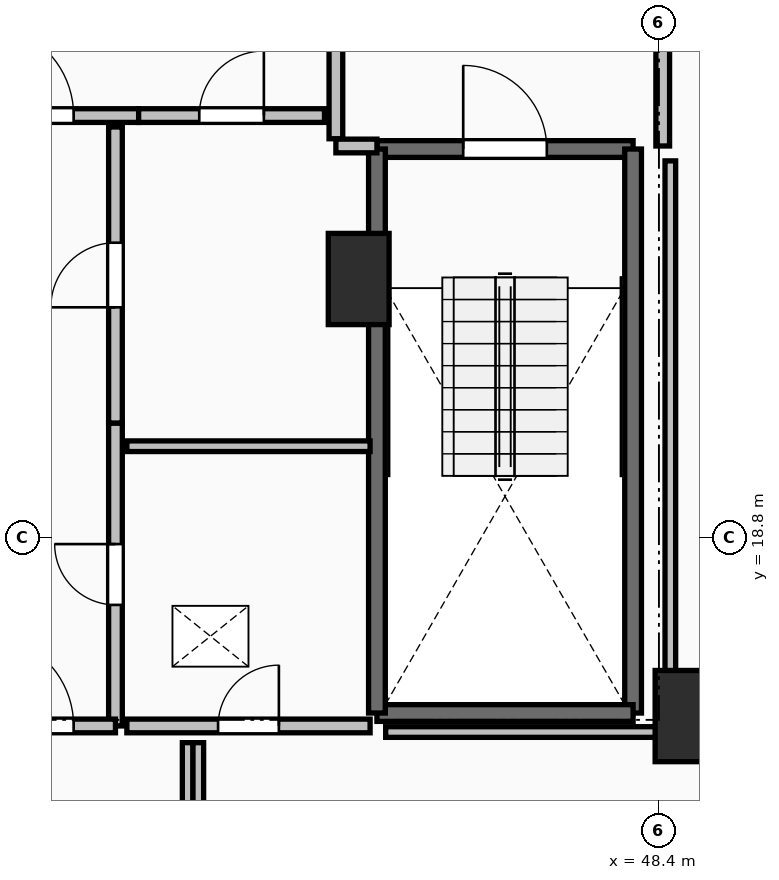
"""IFC4 building model, lengths in metres.
Left out: names, types, materials, properties, quantities, classifications, styles, units other than length and angle.
Written with IfcOpenShell. Run it as: python <this file> out.ifc"""

import sys

from ifc_helpers import new_model, si_unit, direction, frame, frame_2d, origin, origin_2d, place, context, subcontext, project, spatial, rectangle, extrude, element, fill, save


model = new_model("IFC4")
c1 = context("Model", 3, precision=1e-05, world=origin(), true_north=direction((0.0, 1.0)))
c2 = subcontext(c1, "Body", "Model", "MODEL_VIEW")
j1 = project(units=[si_unit("LENGTHUNIT", "METRE"), si_unit("PLANEANGLEUNIT", "RADIAN")], contexts=[c1])
p1 = place(None, origin())
s1 = spatial("IfcSite", under=j1, at=p1, CompositionType="ELEMENT")
p2 = place(p1, origin())
s2 = spatial("IfcBuilding", under=s1, at=p2, CompositionType="ELEMENT")
p3 = place(p2, frame((0.0, 0.0, 150.1)))
s3 = spatial("IfcBuildingStorey", under=s2, at=p3, CompositionType="ELEMENT", Elevation=150.1)
for number, where, z_axis, x_axis in (
    (1, (48.75, 16.45, 0.0), (0.0, 0.0, 1.0), (1.0, 0.0, 0.0)),
    (2, (44.45, 22.2, 0.0), (0.0, 0.0, 1.0), (1.0, 0.0, 0.0)),
):
    element("IfcColumn", number, at=place(p3, frame(where, z_axis=z_axis, x_axis=x_axis)), inside=s3, PredefinedType="PILASTER", context=c2, shape_type="SweptSolid", body=[
        extrude(rectangle(XDim=0.8, YDim=1.2, at=origin_2d()), origin(), (0.0, 0.0, 1.0), 3.5),
    ])
p4 = place(p3, frame((44.69, 23.91, 0.0), z_axis=(0.0, 0.0, 1.0), x_axis=(1.0, 0.0, 0.0)))
e3 = element("IfcWall", 3, at=p4, inside=s3, PredefinedType="SOLIDWALL", context=c2, shape_type="SweptSolid", body=[
    extrude(rectangle(XDim=3.37, YDim=0.22, at=frame_2d((1.685, 0.0))), origin(), (0.0, 0.0, 1.0), 3.24),
])
p5 = place(p4, frame((1.135, 0.0, 0.0)))
e4 = element("IfcOpeningElement", 4, at=p5, cuts=e3, PredefinedType="OPENING", context=c2, shape_type="SweptSolid", body=[
    extrude(rectangle(XDim=1.1, YDim=2.15, at=frame_2d((0.55, 1.075))), frame((0.0, 0.125, 0.0), z_axis=(0.0, -1.0, 0.0), x_axis=(1.0, 0.0, 0.0)), (0.0, 0.0, 1.0), 0.25),
])
p6 = place(p3, frame((48.06, 23.91, 0.0), z_axis=(0.0, 0.0, 1.0), x_axis=(0.0, -1.0, 0.0)))
e5 = element("IfcWall", 5, at=p6, inside=s3, PredefinedType="SOLIDWALL", context=c2, shape_type="SweptSolid", body=[
    extrude(rectangle(XDim=7.42, YDim=0.22, at=frame_2d((3.71, 0.0))), origin(), (0.0, 0.0, 1.0), 3.24),
])
p7 = place(p3, frame((48.06, 16.49, 0.0), z_axis=(0.0, 0.0, 1.0), x_axis=(-1.0, 0.0, 0.0)))
e6 = element("IfcWall", 6, at=p7, inside=s3, PredefinedType="SOLIDWALL", context=c2, shape_type="SweptSolid", body=[
    extrude(rectangle(XDim=3.37, YDim=0.22, at=frame_2d((1.685, 0.0))), origin(), (0.0, 0.0, 1.0), 3.24),
])
p8 = place(p3, frame((44.69, 16.49, 0.0), z_axis=(0.0, 0.0, 1.0), x_axis=(0.0, 1.0, 0.0)))
e7 = element("IfcWall", 7, at=p8, inside=s3, PredefinedType="SOLIDWALL", context=c2, shape_type="SweptSolid", body=[
    extrude(rectangle(XDim=7.42, YDim=0.22, at=frame_2d((3.71, 0.0))), origin(), (0.0, 0.0, 1.0), 3.24),
])
p9 = place(p3, frame((44.15, 27.955, 0.0), z_axis=(0.0, 0.0, 1.0), x_axis=(0.0, -1.0, 0.0)))
e8 = element("IfcWall", 8, at=p9, inside=s3, PredefinedType="PARTITIONING", context=c2, shape_type="SweptSolid", body=[
    extrude(rectangle(XDim=3.91, YDim=0.18, at=frame_2d((1.955, 0.0))), origin(), (0.0, 0.0, 1.0), 3.24),
])
p10 = place(p9, frame((1.355, 0.0, 0.0)))
e9 = element("IfcOpeningElement", 9, at=p10, cuts=e8, PredefinedType="OPENING", context=c2, shape_type="SweptSolid", body=[
    extrude(rectangle(XDim=1.2, YDim=2.15, at=frame_2d((0.6, 1.075))), frame((0.0, 0.105, 0.0), z_axis=(0.0, -1.0, 0.0), x_axis=(1.0, 0.0, 0.0)), (0.0, 0.0, 1.0), 0.21),
])
p11 = place(p3, frame((44.15, 23.95, 0.0), z_axis=(0.0, 0.0, 1.0), x_axis=(1.0, 0.0, 0.0)))
e10 = element("IfcWall", 10, at=p11, inside=s3, PredefinedType="PARTITIONING", context=c2, shape_type="SweptSolid", body=[
    extrude(rectangle(XDim=0.54, YDim=0.18, at=frame_2d((0.27, 0.0))), origin(), (0.0, 0.0, 1.0), 3.24),
])
p12 = place(p3, frame((48.45, 23.95, 0.0), z_axis=(0.0, 0.0, 1.0), x_axis=(0.0, 1.0, 0.0)))
e11 = element("IfcWall", 11, at=p12, inside=s3, PredefinedType="PARTITIONING", context=c2, shape_type="SweptSolid", body=[
    extrude(rectangle(XDim=4.05, YDim=0.18, at=frame_2d((2.025, 0.0))), origin(), (0.0, 0.0, 1.0), 3.24),
])
p13 = place(p12, frame((1.425, 0.0, 0.0)))
e12 = element("IfcOpeningElement", 12, at=p13, cuts=e11, PredefinedType="OPENING", context=c2, shape_type="SweptSolid", body=[
    extrude(rectangle(XDim=1.2, YDim=2.15, at=frame_2d((0.6, 1.075))), frame((0.0, 0.105, 0.0), z_axis=(0.0, -1.0, 0.0), x_axis=(1.0, 0.0, 0.0)), (0.0, 0.0, 1.0), 0.21),
])
p14 = place(p3, frame((38.645, 24.35, 0.0), z_axis=(0.0, 0.0, 1.0), x_axis=(1.0, 0.0, 0.0)))
e13 = element("IfcWall", 13, at=p14, inside=s3, PredefinedType="PARTITIONING", context=c2, shape_type="SweptSolid", body=[
    extrude(rectangle(XDim=2.91, YDim=0.18, at=frame_2d((1.455, 0.0))), origin(), (0.0, 0.0, 1.0), 3.24),
])
p15 = place(p14, frame((0.855, 0.0, 0.0)))
e14 = element("IfcOpeningElement", 14, at=p15, cuts=e13, PredefinedType="OPENING", context=c2, shape_type="SweptSolid", body=[
    extrude(rectangle(XDim=1.2, YDim=2.15, at=frame_2d((0.6, 1.075))), frame((0.0, 0.105, 0.0), z_axis=(0.0, -1.0, 0.0), x_axis=(1.0, 0.0, 0.0)), (0.0, 0.0, 1.0), 0.21),
])
p16 = place(p3, frame((41.555, 24.35, 0.0), z_axis=(0.0, 0.0, 1.0), x_axis=(1.0, 0.0, 0.0)))
e15 = element("IfcWall", 15, at=p16, inside=s3, PredefinedType="PARTITIONING", context=c2, shape_type="SweptSolid", body=[
    extrude(rectangle(XDim=2.445, YDim=0.18, at=frame_2d((1.223, 0.0))), origin(), (0.0, 0.0, 1.0), 3.24),
])
p17 = place(p16, frame((0.798, 0.0, 0.0)))
e16 = element("IfcOpeningElement", 16, at=p17, cuts=e15, PredefinedType="OPENING", context=c2, shape_type="SweptSolid", body=[
    extrude(rectangle(XDim=0.85, YDim=2.1, at=frame_2d((0.425, 1.05))), frame((0.0, 0.105, 0.0), z_axis=(0.0, -1.0, 0.0), x_axis=(1.0, 0.0, 0.0)), (0.0, 0.0, 1.0), 0.21),
])
p18 = place(p3, frame((41.25, 16.32, 0.0), z_axis=(0.0, 0.0, 1.0), x_axis=(0.0, 1.0, 0.0)))
e17 = element("IfcWall", 17, at=p18, inside=s3, PredefinedType="PARTITIONING", context=c2, shape_type="SweptSolid", body=[
    extrude(rectangle(XDim=3.985, YDim=0.18, at=frame_2d((1.992, 0.0))), origin(), (0.0, 0.0, 1.0), 3.24),
])
p19 = place(p18, frame((1.593, 0.0, 0.0)))
e18 = element("IfcOpeningElement", 18, at=p19, cuts=e17, PredefinedType="OPENING", context=c2, shape_type="SweptSolid", body=[
    extrude(rectangle(XDim=0.8, YDim=2.05, at=frame_2d((0.4, 1.025))), frame((0.0, 0.105, 0.0), z_axis=(0.0, -1.0, 0.0), x_axis=(1.0, 0.0, 0.0)), (0.0, 0.0, 1.0), 0.21),
])
p20 = place(p3, frame((41.25, 20.305, 0.0), z_axis=(0.0, 0.0, 1.0), x_axis=(0.0, 1.0, 0.0)))
e19 = element("IfcWall", 19, at=p20, inside=s3, PredefinedType="PARTITIONING", context=c2, shape_type="SweptSolid", body=[
    extrude(rectangle(XDim=3.895, YDim=0.18, at=frame_2d((1.948, 0.0))), origin(), (0.0, 0.0, 1.0), 3.24),
])
p21 = place(p20, frame((1.522, 0.0, 0.0)))
e20 = element("IfcOpeningElement", 20, at=p21, cuts=e19, PredefinedType="OPENING", context=c2, shape_type="SweptSolid", body=[
    extrude(rectangle(XDim=0.85, YDim=2.1, at=frame_2d((0.425, 1.05))), frame((0.0, 0.105, 0.0), z_axis=(0.0, -1.0, 0.0), x_axis=(1.0, 0.0, 0.0)), (0.0, 0.0, 1.0), 0.21),
])
p22 = place(p3, frame((38.95, 16.32, 0.0), z_axis=(0.0, 0.0, 1.0), x_axis=(1.0, 0.0, 0.0)))
e21 = element("IfcWall", 21, at=p22, inside=s3, PredefinedType="PARTITIONING", context=c2, shape_type="SweptSolid", body=[
    extrude(rectangle(XDim=2.3, YDim=0.18, at=frame_2d((1.15, 0.0))), origin(), (0.0, 0.0, 1.0), 3.24),
])
p23 = place(p22, frame((0.55, 0.0, 0.0)))
e22 = element("IfcOpeningElement", 22, at=p23, cuts=e21, PredefinedType="OPENING", context=c2, shape_type="SweptSolid", body=[
    extrude(rectangle(XDim=1.2, YDim=2.15, at=frame_2d((0.6, 1.075))), frame((0.0, 0.105, 0.0), z_axis=(0.0, -1.0, 0.0), x_axis=(1.0, 0.0, 0.0)), (0.0, 0.0, 1.0), 0.21),
])
p24 = place(p3, frame((44.6, 20.0, 0.0), z_axis=(0.0, 0.0, 1.0), x_axis=(-1.0, 0.0, 0.0)))
e23 = element("IfcWall", 23, at=p24, inside=s3, PredefinedType="PARTITIONING", context=c2, shape_type="SweptSolid", body=[
    extrude(rectangle(XDim=3.2, YDim=0.14, at=frame_2d((1.6, 0.0))), origin(), (0.0, 0.0, 1.0), 3.24),
])
p25 = place(p3, frame((41.4, 16.32, 0.0), z_axis=(0.0, 0.0, 1.0), x_axis=(1.0, 0.0, 0.0)))
e24 = element("IfcWall", 24, at=p25, inside=s3, PredefinedType="PARTITIONING", context=c2, shape_type="SweptSolid", body=[
    extrude(rectangle(XDim=3.2, YDim=0.18, at=frame_2d((1.6, 0.0))), origin(), (0.0, 0.0, 1.0), 3.24),
])
p26 = place(p25, frame((1.2, 0.0, 0.0)))
e25 = element("IfcOpeningElement", 25, at=p26, cuts=e24, PredefinedType="OPENING", context=c2, shape_type="SweptSolid", body=[
    extrude(rectangle(XDim=0.8, YDim=2.05, at=frame_2d((0.4, 1.025))), frame((0.0, 0.105, 0.0), z_axis=(0.0, -1.0, 0.0), x_axis=(1.0, 0.0, 0.0)), (0.0, 0.0, 1.0), 0.21),
])
p27 = place(p3, frame((44.805, 16.24, 0.0), z_axis=(0.0, 0.0, 1.0), x_axis=(1.0, 0.0, 0.0)))
e26 = element("IfcWall", 26, at=p27, inside=s3, PredefinedType="PARTITIONING", context=c2, shape_type="SweptSolid", body=[
    extrude(rectangle(XDim=3.745, YDim=0.14, at=frame_2d((1.873, 0.0))), origin(), (0.0, 0.0, 1.0), 2.432),
])
p28 = place(p3, frame((48.55, 16.24, 0.0), z_axis=(0.0, 0.0, 1.0), x_axis=(0.0, 1.0, 0.0)))
e27 = element("IfcWall", 27, at=p28, inside=s3, PredefinedType="PARTITIONING", context=c2, shape_type="SweptSolid", body=[
    extrude(rectangle(XDim=7.514, YDim=0.14, at=frame_2d((3.757, 0.0))), origin(), (0.0, 0.0, 1.0), 2.432),
])
for number, where, z_axis, x_axis in (
    (28, (42.2, 16.1, 0.0), (0.0, 0.0, 1.0), (0.0, -1.0, 0.0)),
    (29, (42.34, 14.27, 0.0), (0.0, 0.0, 1.0), (0.0, 1.0, 0.0)),
):
    element("IfcWall", number, at=place(p3, frame(where, z_axis=z_axis, x_axis=x_axis)), inside=s3, PredefinedType="PARTITIONING", context=c2, shape_type="SweptSolid", body=[
        extrude(rectangle(XDim=1.83, YDim=0.14, at=frame_2d((0.915, 0.0))), origin(), (0.0, 0.0, 1.0), 2.886),
    ])
p29 = place(p5, origin())
e30 = element("IfcDoor", 30, at=p29, inside=s3, OperationType="SINGLE_SWING_LEFT", PredefinedType="DOOR", context=c2, shape_type="SweptSolid", body=[
    extrude(rectangle(XDim=1.1, YDim=2.15, at=frame_2d((0.55, 1.075))), frame((0.0, 0.025, 0.0), z_axis=(0.0, -1.0, 0.0), x_axis=(1.0, 0.0, 0.0)), (0.0, 0.0, 1.0), 0.05),
])
fill(e4, e30)
p30 = place(p15, origin())
e31 = element("IfcDoor", 31, at=p30, inside=s3, OperationType="SINGLE_SWING_LEFT", PredefinedType="DOOR", context=c2, shape_type="SweptSolid", body=[
    extrude(rectangle(XDim=1.2, YDim=2.15, at=frame_2d((0.6, 1.075))), frame((0.0, 0.025, 0.0), z_axis=(0.0, -1.0, 0.0), x_axis=(1.0, 0.0, 0.0)), (0.0, 0.0, 1.0), 0.05),
])
fill(e14, e31)
p31 = place(p17, origin())
e32 = element("IfcDoor", 32, at=p31, inside=s3, OperationType="SINGLE_SWING_RIGHT", PredefinedType="DOOR", context=c2, shape_type="SweptSolid", body=[
    extrude(rectangle(XDim=0.85, YDim=2.1, at=frame_2d((0.425, 1.05))), frame((0.0, 0.025, 0.0), z_axis=(0.0, -1.0, 0.0), x_axis=(1.0, 0.0, 0.0)), (0.0, 0.0, 1.0), 0.05),
])
fill(e16, e32)
p32 = place(p19, origin())
e33 = element("IfcDoor", 33, at=p32, inside=s3, OperationType="SINGLE_SWING_RIGHT", PredefinedType="DOOR", context=c2, shape_type="SweptSolid", body=[
    extrude(rectangle(XDim=0.8, YDim=2.05, at=frame_2d((0.4, 1.025))), frame((0.0, 0.025, 0.0), z_axis=(0.0, -1.0, 0.0), x_axis=(1.0, 0.0, 0.0)), (0.0, 0.0, 1.0), 0.05),
])
fill(e18, e33)
p33 = place(p21, origin())
e34 = element("IfcDoor", 34, at=p33, inside=s3, OperationType="SINGLE_SWING_LEFT", PredefinedType="DOOR", context=c2, shape_type="SweptSolid", body=[
    extrude(rectangle(XDim=0.85, YDim=2.1, at=frame_2d((0.425, 1.05))), frame((0.0, 0.025, 0.0), z_axis=(0.0, -1.0, 0.0), x_axis=(1.0, 0.0, 0.0)), (0.0, 0.0, 1.0), 0.05),
])
fill(e20, e34)
p34 = place(p23, origin())
e35 = element("IfcDoor", 35, at=p34, inside=s3, OperationType="SINGLE_SWING_LEFT", PredefinedType="DOOR", context=c2, shape_type="SweptSolid", body=[
    extrude(rectangle(XDim=1.2, YDim=2.15, at=frame_2d((0.6, 1.075))), frame((0.0, 0.025, 0.0), z_axis=(0.0, -1.0, 0.0), x_axis=(1.0, 0.0, 0.0)), (0.0, 0.0, 1.0), 0.05),
])
fill(e22, e35)
p35 = place(p26, origin())
e36 = element("IfcDoor", 36, at=p35, inside=s3, OperationType="SINGLE_SWING_RIGHT", PredefinedType="DOOR", context=c2, shape_type="SweptSolid", body=[
    extrude(rectangle(XDim=0.8, YDim=2.05, at=frame_2d((0.4, 1.025))), frame((0.0, 0.025, 0.0), z_axis=(0.0, -1.0, 0.0), x_axis=(1.0, 0.0, 0.0)), (0.0, 0.0, 1.0), 0.05),
])
fill(e25, e36)
save(model, sys.argv[1])
